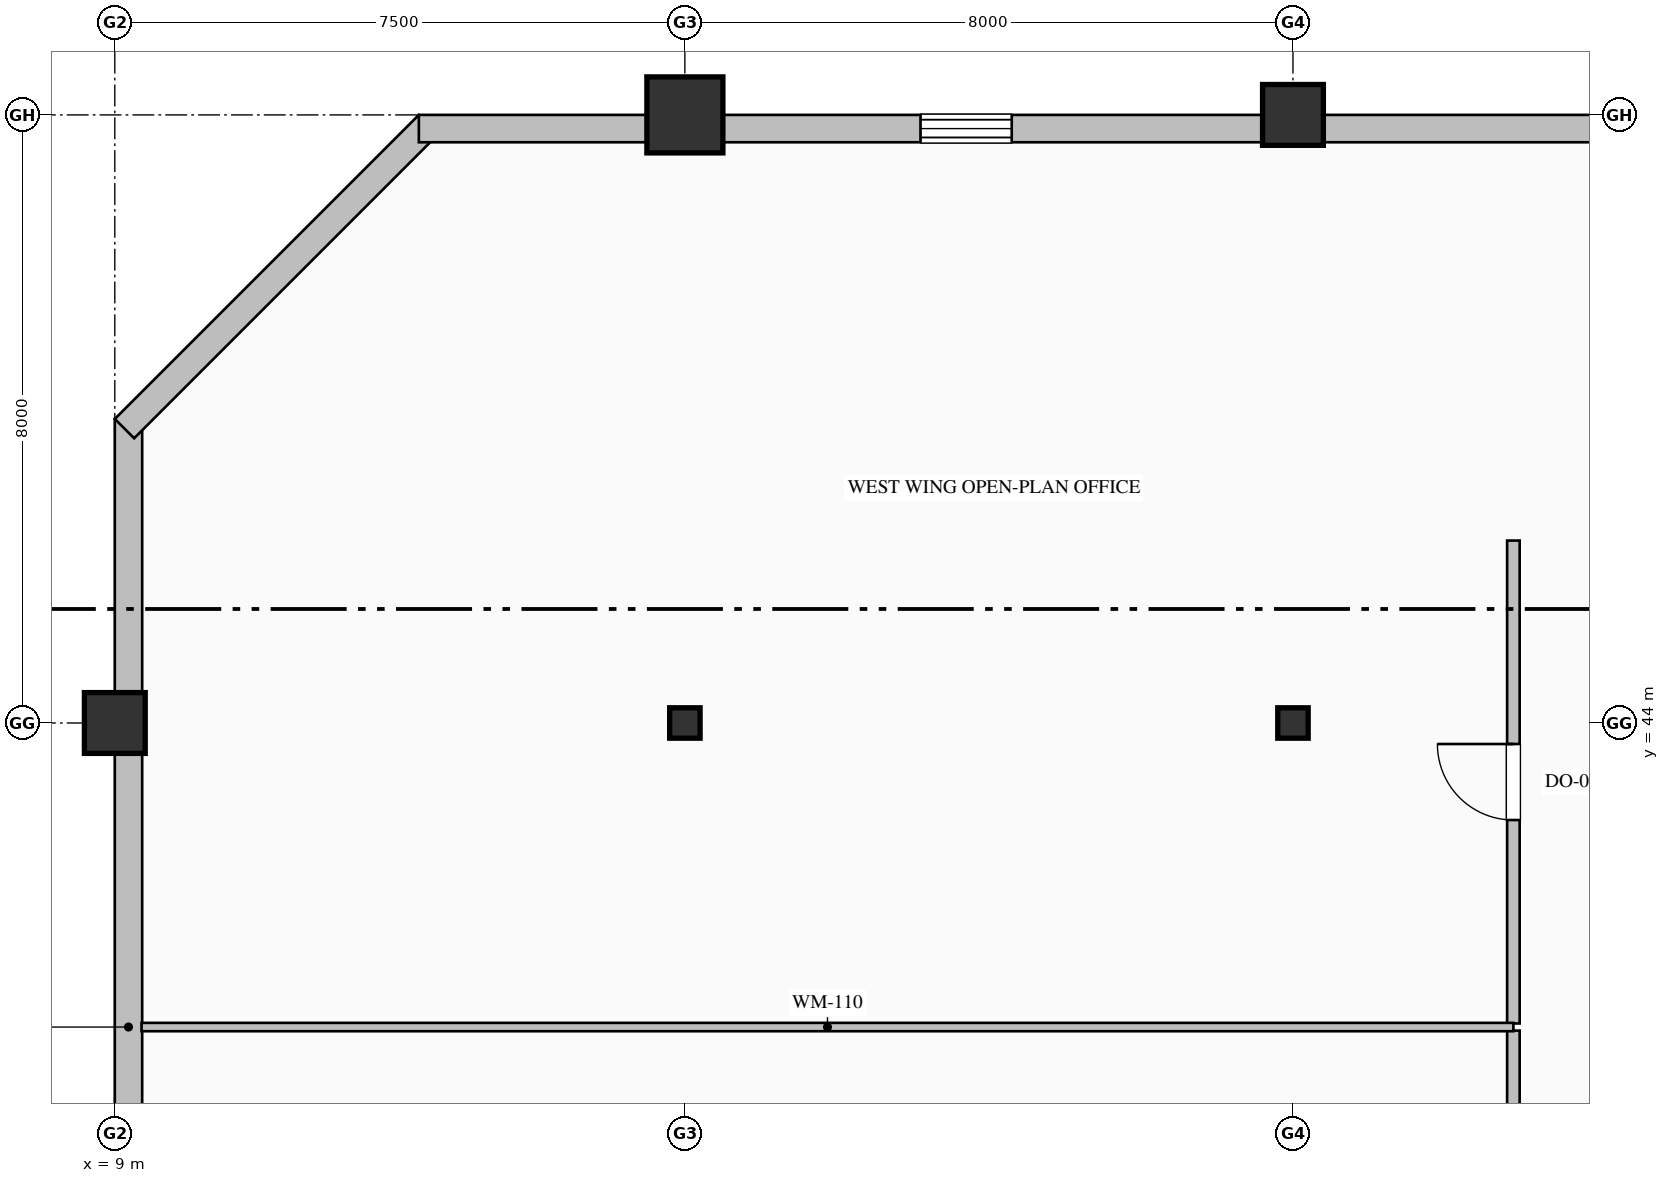
"""IFC4 building model, lengths in metres.
Left out: names, types, materials, properties, quantities, classifications, styles, units other than length and angle.
Written with IfcOpenShell. Run it as: python <this file> out.ifc"""

import sys

from ifc_helpers import new_model, si_unit, direction, frame, frame_2d, origin, origin_2d, place, context, subcontext, project, spatial, rectangle, hollow_rectangle, hollow_circle, i_section, extrude, element, fill, save


model = new_model("IFC4")
c1 = context("Model", 3, precision=1e-05, world=origin(), true_north=direction((0.0, 1.0)))
c2 = subcontext(c1, "Body", "Model", "MODEL_VIEW")
j1 = project(units=[si_unit("LENGTHUNIT", "METRE"), si_unit("PLANEANGLEUNIT", "RADIAN")], contexts=[c1])
p1 = place(None, origin())
s1 = spatial("IfcSite", under=j1, at=p1, CompositionType="ELEMENT")
p2 = place(p1, origin())
s2 = spatial("IfcBuilding", under=s1, at=p2, CompositionType="ELEMENT")
p3 = place(p2, frame((0.0, 0.0, 237.8)))
s3 = spatial("IfcBuildingStorey", under=s2, at=p3, CompositionType="ELEMENT", Elevation=237.8)
p4 = place(p3, frame((9.0, 44.0, 0.0), z_axis=(0.0, 0.0, 1.0), x_axis=(1.0, 0.0, 0.0)))
e1 = element("IfcColumn", 1, at=p4, inside=s3, PredefinedType="COLUMN", context=c2, shape_type="SweptSolid", body=[
    extrude(hollow_rectangle(XDim=0.8, YDim=0.8, WallThickness=0.032, at=origin_2d()), origin(), (0.0, 0.0, 1.0), 4.0),
])
p5 = place(p3, frame((16.5, 44.0, 0.0), z_axis=(0.0, 0.0, 1.0), x_axis=(1.0, 0.0, 0.0)))
e2 = element("IfcColumn", 2, at=p5, inside=s3, PredefinedType="COLUMN", context=c2, shape_type="SweptSolid", body=[
    extrude(i_section(OverallWidth=0.4, OverallDepth=0.4, WebThickness=0.013, FlangeThickness=0.021, FilletRadius=0.022, at=origin_2d()), origin(), (0.0, 0.0, 1.0), 4.0),
])
p6 = place(p3, frame((16.5, 52.0, 0.0), z_axis=(0.0, 0.0, 1.0), x_axis=(1.0, 0.0, 0.0)))
e3 = element("IfcColumn", 3, at=p6, inside=s3, PredefinedType="COLUMN", context=c2, shape_type="SweptSolid", body=[
    extrude(hollow_circle(Radius=0.5, WallThickness=0.036, at=origin_2d()), origin(), (0.0, 0.0, 1.0), 4.0),
])
p7 = place(p3, frame((24.5, 44.0, 0.0), z_axis=(0.0, 0.0, 1.0), x_axis=(1.0, 0.0, 0.0)))
e4 = element("IfcColumn", 4, at=p7, inside=s3, PredefinedType="COLUMN", context=c2, shape_type="SweptSolid", body=[
    extrude(i_section(OverallWidth=0.4, OverallDepth=0.4, WebThickness=0.013, FlangeThickness=0.021, FilletRadius=0.022, at=origin_2d()), origin(), (0.0, 0.0, 1.0), 4.0),
])
p8 = place(p3, frame((24.5, 52.0, 0.0), z_axis=(0.0, 0.0, 1.0), x_axis=(1.0, 0.0, 0.0)))
e5 = element("IfcColumn", 5, at=p8, inside=s3, PredefinedType="COLUMN", context=c2, shape_type="SweptSolid", body=[
    extrude(hollow_rectangle(XDim=0.8, YDim=0.8, WallThickness=0.032, at=origin_2d()), origin(), (0.0, 0.0, 1.0), 4.0),
])
p9 = place(p3, frame((9.18, 32.0, 0.0), z_axis=(0.0, 0.0, 1.0), x_axis=(0.0, 1.0, 0.0)))
e6 = element("IfcWall", 6, at=p9, inside=s3, PredefinedType="SOLIDWALL", context=c2, shape_type="SweptSolid", body=[
    extrude(rectangle(XDim=16.0, YDim=0.36, at=frame_2d((8.0, 0.0))), origin(), (0.0, 0.0, 1.0), 3.325),
])
p10 = place(p3, frame((9.127, 47.873, 0.0), z_axis=(0.0, 0.0, 1.0), x_axis=(0.707106781187, 0.707106781187, 0.0)))
e7 = element("IfcWall", 7, at=p10, inside=s3, PredefinedType="SOLIDWALL", context=c2, shape_type="SweptSolid", body=[
    extrude(rectangle(XDim=5.657, YDim=0.36, at=frame_2d((2.828, 0.0))), origin(), (0.0, 0.0, 1.0), 3.775),
])
p11 = place(p3, frame((13.0, 51.82, 0.0), z_axis=(0.0, 0.0, 1.0), x_axis=(1.0, 0.0, 0.0)))
e8 = element("IfcWall", 8, at=p11, inside=s3, PredefinedType="SOLIDWALL", context=c2, shape_type="SweptSolid", body=[
    extrude(rectangle(XDim=27.52, YDim=0.36, at=frame_2d((13.76, 0.0))), origin(), (0.0, 0.0, 1.0), 3.325),
])
p12 = place(p11, frame((6.6, 0.0, 0.9)))
e9 = element("IfcOpeningElement", 9, at=p12, cuts=e8, PredefinedType="OPENING", context=c2, shape_type="SweptSolid", body=[
    extrude(rectangle(XDim=1.2, YDim=1.85, at=frame_2d((0.6, 0.925))), frame((0.0, 0.19, 0.0), z_axis=(0.0, -1.0, 0.0), x_axis=(1.0, 0.0, 0.0)), (0.0, 0.0, 1.0), 0.38),
])
p13 = place(p11, frame((17.4, 0.0, 0.9)))
e10 = element("IfcOpeningElement", 10, at=p13, cuts=e8, PredefinedType="OPENING", context=c2, shape_type="SweptSolid", body=[
    extrude(rectangle(XDim=1.2, YDim=1.85, at=frame_2d((0.6, 0.925))), frame((0.0, 0.19, 0.0), z_axis=(0.0, -1.0, 0.0), x_axis=(1.0, 0.0, 0.0)), (0.0, 0.0, 1.0), 0.38),
])
p14 = place(p3, frame((27.4, 40.047, 0.0), z_axis=(0.0, 0.0, 1.0), x_axis=(0.0, 1.0, 0.0)))
e11 = element("IfcWall", 11, at=p14, inside=s3, PredefinedType="PARTITIONING", context=c2, shape_type="SweptSolid", body=[
    extrude(rectangle(XDim=6.353, YDim=0.165, at=frame_2d((3.176, 0.0))), origin(), (0.0, 0.0, 1.0), 3.775),
])
p15 = place(p14, frame((2.677, 0.0, 0.0)))
e12 = element("IfcOpeningElement", 12, at=p15, cuts=e11, PredefinedType="OPENING", context=c2, shape_type="SweptSolid", body=[
    extrude(rectangle(XDim=1.0, YDim=2.15, at=frame_2d((0.5, 1.075))), frame((0.0, 0.093, 0.0), z_axis=(0.0, -1.0, 0.0), x_axis=(1.0, 0.0, 0.0)), (0.0, 0.0, 1.0), 0.185),
])
p16 = place(p3, frame((27.4, 32.675, 0.0), z_axis=(0.0, 0.0, 1.0), x_axis=(0.0, 1.0, 0.0)))
e13 = element("IfcWall", 13, at=p16, inside=s3, PredefinedType="PARTITIONING", context=c2, shape_type="SweptSolid", body=[
    extrude(rectangle(XDim=7.278, YDim=0.165, at=frame_2d((3.639, 0.0))), origin(), (0.0, 0.0, 1.0), 3.775),
])
p17 = place(p3, frame((27.4, 40.0, 0.0), z_axis=(0.0, 0.0, 1.0), x_axis=(-1.0, 0.0, 0.0)))
e14 = element("IfcWall", 14, at=p17, inside=s3, PredefinedType="MOVABLE", context=c2, shape_type="SweptSolid", body=[
    extrude(rectangle(XDim=18.048, YDim=0.11, at=frame_2d((9.024, 0.0))), origin(), (0.0, 0.0, 1.0), 3.467),
])
p18 = place(p12, origin())
e15 = element("IfcWindow", 15, at=p18, inside=s3, PartitioningType="DOUBLE_PANEL_VERTICAL", PredefinedType="WINDOW", context=c2, shape_type="SweptSolid", body=[
    extrude(rectangle(XDim=1.2, YDim=1.85, at=frame_2d((0.6, 0.925))), frame((0.0, 0.15, 0.0), z_axis=(0.0, -1.0, 0.0), x_axis=(1.0, 0.0, 0.0)), (0.0, 0.0, 1.0), 0.06),
])
fill(e9, e15)
p19 = place(p15, origin())
e16 = element("IfcDoor", 16, at=p19, inside=s3, OperationType="SINGLE_SWING_RIGHT", PredefinedType="DOOR", context=c2, shape_type="SweptSolid", body=[
    extrude(rectangle(XDim=1.0, YDim=2.15, at=frame_2d((0.5, 1.075))), frame((0.0, 0.025, 0.0), z_axis=(0.0, -1.0, 0.0), x_axis=(1.0, 0.0, 0.0)), (0.0, 0.0, 1.0), 0.05),
])
fill(e12, e16)
save(model, sys.argv[1])
